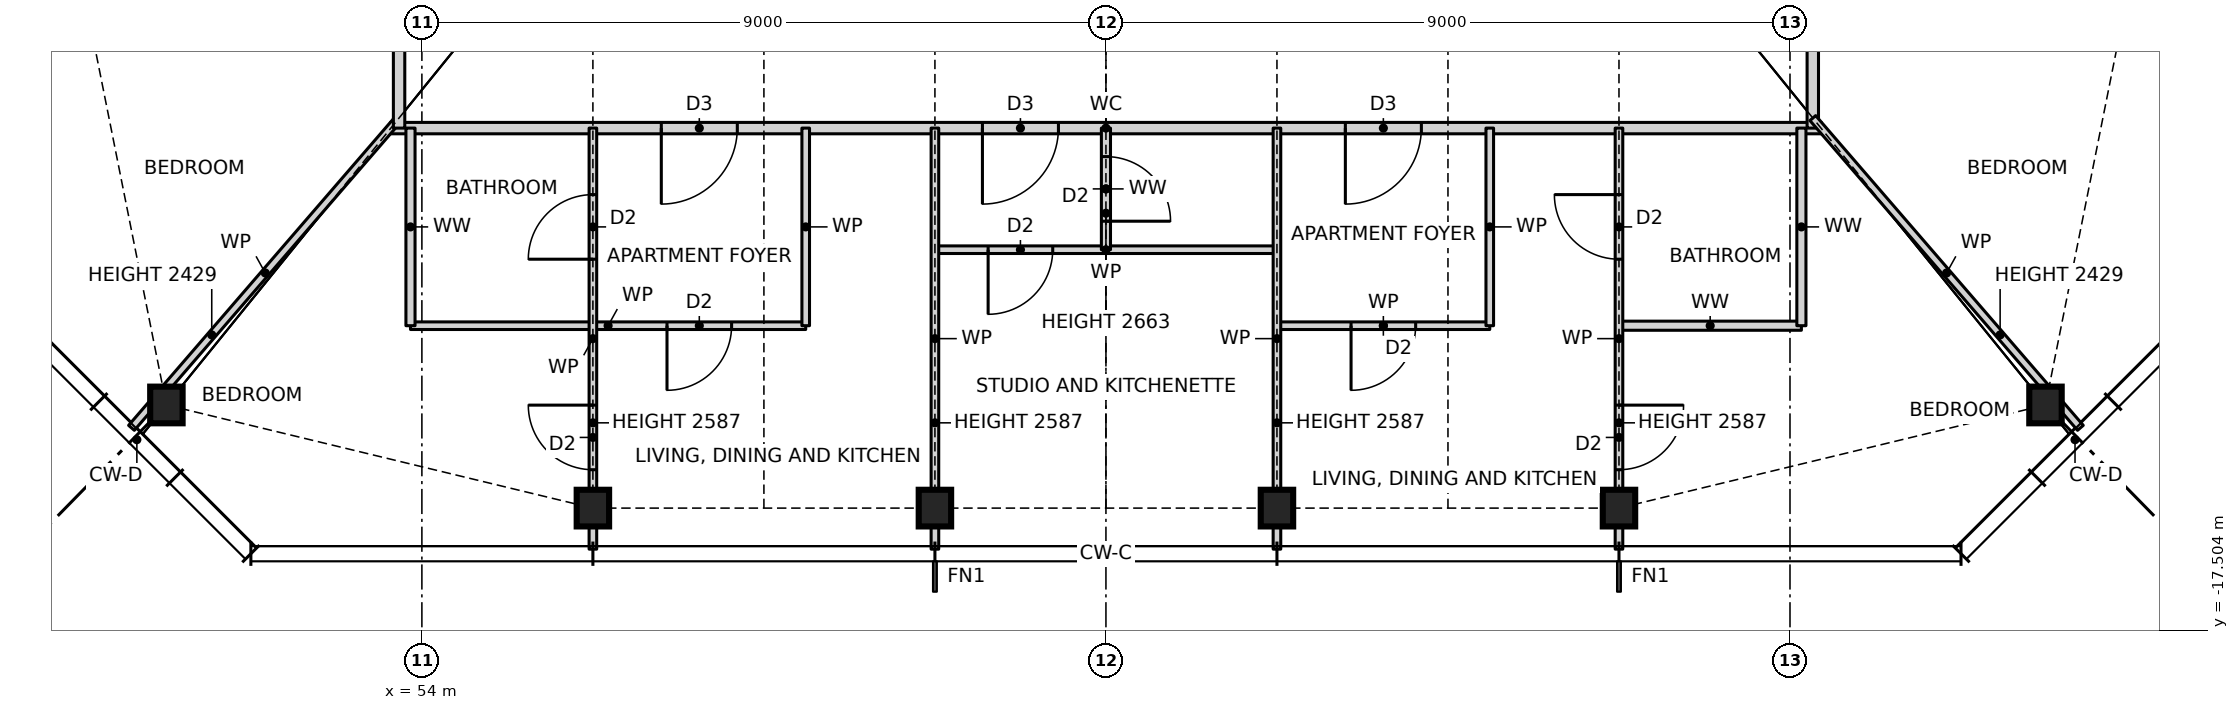
"""IFC4 building model, lengths in metres.
Left out: names, types, materials, properties, quantities, classifications, styles, units other than length and angle.
Written with IfcOpenShell. Run it as: python <this file> out.ifc"""

import sys

from ifc_helpers import new_model, si_unit, direction, frame, frame_2d, origin, origin_2d, place, context, subcontext, project, spatial, rectangle, i_section, extrude, element, fill, save


model = new_model("IFC4")
c1 = context("Model", 3, precision=1e-05, world=origin(), true_north=direction((0.0, 1.0)))
c2 = subcontext(c1, "Body", "Model", "MODEL_VIEW")
j1 = project(units=[si_unit("LENGTHUNIT", "METRE"), si_unit("PLANEANGLEUNIT", "RADIAN")], contexts=[c1])
p1 = place(None, origin())
s1 = spatial("IfcSite", under=j1, at=p1, CompositionType="ELEMENT")
p2 = place(p1, origin())
s2 = spatial("IfcBuilding", under=s1, at=p2, CompositionType="ELEMENT")
p3 = place(p2, frame((0.0, 0.0, 87.5)))
s3 = spatial("IfcBuildingStorey", under=s2, at=p3, CompositionType="ELEMENT", Elevation=87.5)
for number, where, z_axis, x_axis in (
    (1, (50.639, -14.543, 0.0), (0.0, 0.0, 1.0), (1.0, 0.0, 0.0)),
    (2, (56.25, -15.9, 0.0), (0.0, 0.0, 1.0), (1.0, 0.0, 0.0)),
    (3, (60.75, -15.9, 0.0), (0.0, 0.0, 1.0), (1.0, 0.0, 0.0)),
    (4, (65.25, -15.9, 0.0), (0.0, 0.0, 1.0), (1.0, 0.0, 0.0)),
    (5, (69.75, -15.9, 0.0), (0.0, 0.0, 1.0), (1.0, 0.0, 0.0)),
    (6, (75.361, -14.543, 0.0), (0.0, 0.0, 1.0), (1.0, 0.0, 0.0)),
):
    element("IfcColumn", number, at=place(p3, frame(where, z_axis=z_axis, x_axis=x_axis)), inside=s3, PredefinedType="COLUMN", context=c2, shape_type="SweptSolid", body=[
        extrude(i_section(OverallWidth=0.427, OverallDepth=0.483, WebThickness=0.051, FlangeThickness=0.082, at=origin_2d()), origin(), (0.0, 0.0, 1.0), 3.5),
    ])
p4 = place(p3, frame((53.85, -13.5, 0.0), z_axis=(0.0, 0.0, 1.0), x_axis=(1.0, 0.0, 0.0)))
e7 = element("IfcWall", 7, at=p4, inside=s3, PredefinedType="PARTITIONING", context=c2, shape_type="SweptSolid", body=[
    extrude(rectangle(XDim=5.2, YDim=0.1, at=frame_2d((2.6, 0.0))), origin(), (0.0, 0.0, 1.0), 3.27),
])
p5 = place(p4, frame((3.375, 0.0, 0.0)))
e8 = element("IfcOpeningElement", 8, at=p5, cuts=e7, PredefinedType="OPENING", context=c2, shape_type="SweptSolid", body=[
    extrude(rectangle(XDim=0.85, YDim=2.1, at=frame_2d((0.425, 1.05))), frame((0.0, 0.06, 0.0), z_axis=(0.0, -1.0, 0.0), x_axis=(1.0, 0.0, 0.0)), (0.0, 0.0, 1.0), 0.12),
])
p6 = place(p3, frame((65.25, -13.5, 0.0), z_axis=(0.0, 0.0, 1.0), x_axis=(1.0, 0.0, 0.0)))
e9 = element("IfcWall", 9, at=p6, inside=s3, PredefinedType="PARTITIONING", context=c2, shape_type="SweptSolid", body=[
    extrude(rectangle(XDim=2.8, YDim=0.1, at=frame_2d((1.4, 0.0))), origin(), (0.0, 0.0, 1.0), 3.27),
])
p7 = place(p6, frame((0.975, 0.0, 0.0)))
e10 = element("IfcOpeningElement", 10, at=p7, cuts=e9, PredefinedType="OPENING", context=c2, shape_type="SweptSolid", body=[
    extrude(rectangle(XDim=0.85, YDim=2.1, at=frame_2d((0.425, 1.05))), frame((0.0, 0.06, 0.0), z_axis=(0.0, -1.0, 0.0), x_axis=(1.0, 0.0, 0.0)), (0.0, 0.0, 1.0), 0.12),
])
p8 = place(p3, frame((69.75, -13.5, 0.0), z_axis=(0.0, 0.0, 1.0), x_axis=(1.0, 0.0, 0.0)))
e11 = element("IfcWall", 11, at=p8, inside=s3, PredefinedType="PARTITIONING", context=c2, shape_type="SweptSolid", body=[
    extrude(rectangle(XDim=2.4, YDim=0.12, at=frame_2d((1.2, 0.0))), origin(), (0.0, 0.0, 1.0), 3.27),
])
p9 = place(p3, frame((60.75, -12.5, 0.0), z_axis=(0.0, 0.0, 1.0), x_axis=(1.0, 0.0, 0.0)))
e12 = element("IfcWall", 12, at=p9, inside=s3, PredefinedType="PARTITIONING", context=c2, shape_type="SweptSolid", body=[
    extrude(rectangle(XDim=4.5, YDim=0.1, at=frame_2d((2.25, 0.0))), origin(), (0.0, 0.0, 1.0), 3.27),
])
p10 = place(p9, frame((0.7, 0.0, 0.0)))
e13 = element("IfcOpeningElement", 13, at=p10, cuts=e12, PredefinedType="OPENING", context=c2, shape_type="SweptSolid", body=[
    extrude(rectangle(XDim=0.85, YDim=2.1, at=frame_2d((0.425, 1.05))), frame((0.0, 0.06, 0.0), z_axis=(0.0, -1.0, 0.0), x_axis=(1.0, 0.0, 0.0)), (0.0, 0.0, 1.0), 0.12),
])
p11 = place(p3, frame((53.586, -10.9, 0.0), z_axis=(0.0, 0.0, 1.0), x_axis=(1.0, 0.0, 0.0)))
e14 = element("IfcWall", 14, at=p11, inside=s3, PredefinedType="PARTITIONING", context=c2, shape_type="SweptSolid", body=[
    extrude(rectangle(XDim=18.828, YDim=0.15, at=frame_2d((9.414, 0.0))), origin(), (0.0, 0.0, 1.0), 3.27),
])
p12 = place(p11, frame((3.564, 0.0, 0.0)))
e15 = element("IfcOpeningElement", 15, at=p12, cuts=e14, PredefinedType="OPENING", context=c2, shape_type="SweptSolid", body=[
    extrude(rectangle(XDim=1.0, YDim=2.1, at=frame_2d((0.5, 1.05))), frame((0.0, 0.085, 0.0), z_axis=(0.0, -1.0, 0.0), x_axis=(1.0, 0.0, 0.0)), (0.0, 0.0, 1.0), 0.17),
])
p13 = place(p11, frame((7.789, 0.0, 0.0)))
e16 = element("IfcOpeningElement", 16, at=p13, cuts=e14, PredefinedType="OPENING", context=c2, shape_type="SweptSolid", body=[
    extrude(rectangle(XDim=1.0, YDim=2.1, at=frame_2d((0.5, 1.05))), frame((0.0, 0.085, 0.0), z_axis=(0.0, -1.0, 0.0), x_axis=(1.0, 0.0, 0.0)), (0.0, 0.0, 1.0), 0.17),
])
p14 = place(p11, frame((12.564, 0.0, 0.0)))
e17 = element("IfcOpeningElement", 17, at=p14, cuts=e14, PredefinedType="OPENING", context=c2, shape_type="SweptSolid", body=[
    extrude(rectangle(XDim=1.0, YDim=2.1, at=frame_2d((0.5, 1.05))), frame((0.0, 0.085, 0.0), z_axis=(0.0, -1.0, 0.0), x_axis=(1.0, 0.0, 0.0)), (0.0, 0.0, 1.0), 0.17),
])
p15 = place(p3, frame((50.179, -14.844, 0.0), z_axis=(0.0, 0.0, 1.0), x_axis=(0.653713095188, 0.756742485381, 0.0)))
e18 = element("IfcWall", 18, at=p15, inside=s3, PredefinedType="PARTITIONING", context=c2, shape_type="SweptSolid", body=[
    extrude(rectangle(XDim=5.386, YDim=0.1, at=frame_2d((2.693, 0.0))), origin(), (0.0, 0.0, 1.0), 2.429),
])
p16 = place(p3, frame((72.3, -10.9, 0.0), z_axis=(0.0, 0.0, 1.0), x_axis=(0.0, 1.0, 0.0)))
e19 = element("IfcWall", 19, at=p16, inside=s3, PredefinedType="PARTITIONING", context=c2, shape_type="SweptSolid", body=[
    extrude(rectangle(XDim=21.668, YDim=0.15, at=frame_2d((10.834, 0.0))), origin(), (0.0, 0.0, 1.0), 3.27),
])
p17 = place(p16, frame((10.4, 0.0, 0.0)))
e20 = element("IfcOpeningElement", 20, at=p17, cuts=e19, PredefinedType="OPENING", context=c2, shape_type="SweptSolid", body=[
    extrude(rectangle(XDim=1.0, YDim=2.1, at=frame_2d((0.5, 1.05))), frame((0.0, 0.085, 0.0), z_axis=(0.0, -1.0, 0.0), x_axis=(1.0, 0.0, 0.0)), (0.0, 0.0, 1.0), 0.17),
])
p18 = place(p3, frame((72.15, -13.5, 0.0), z_axis=(0.0, 0.0, 1.0), x_axis=(0.0, 1.0, 0.0)))
e21 = element("IfcWall", 21, at=p18, inside=s3, PredefinedType="PARTITIONING", context=c2, shape_type="SweptSolid", body=[
    extrude(rectangle(XDim=2.6, YDim=0.12, at=frame_2d((1.3, 0.0))), origin(), (0.0, 0.0, 1.0), 3.27),
])
p19 = place(p3, frame((69.75, -16.44, 0.0), z_axis=(0.0, 0.0, 1.0), x_axis=(0.0, 1.0, 0.0)))
e22 = element("IfcWall", 22, at=p19, inside=s3, PredefinedType="PARTITIONING", context=c2, shape_type="SweptSolid", body=[
    extrude(rectangle(XDim=5.54, YDim=0.1, at=frame_2d((2.77, 0.0))), origin(), (0.0, 0.0, 1.0), 2.587),
])
p20 = place(p19, frame((3.815, 0.0, 0.0)))
e23 = element("IfcOpeningElement", 23, at=p20, cuts=e22, PredefinedType="OPENING", context=c2, shape_type="SweptSolid", body=[
    extrude(rectangle(XDim=0.85, YDim=2.1, at=frame_2d((0.425, 1.05))), frame((0.0, 0.06, 0.0), z_axis=(0.0, -1.0, 0.0), x_axis=(1.0, 0.0, 0.0)), (0.0, 0.0, 1.0), 0.12),
])
p21 = place(p19, frame((1.045, 0.0, 0.0)))
e24 = element("IfcOpeningElement", 24, at=p21, cuts=e22, PredefinedType="OPENING", context=c2, shape_type="SweptSolid", body=[
    extrude(rectangle(XDim=0.85, YDim=2.1, at=frame_2d((0.425, 1.05))), frame((0.0, 0.06, 0.0), z_axis=(0.0, -1.0, 0.0), x_axis=(1.0, 0.0, 0.0)), (0.0, 0.0, 1.0), 0.12),
])
p22 = place(p3, frame((68.05, -13.5, 0.0), z_axis=(0.0, 0.0, 1.0), x_axis=(0.0, 1.0, 0.0)))
e25 = element("IfcWall", 25, at=p22, inside=s3, PredefinedType="PARTITIONING", context=c2, shape_type="SweptSolid", body=[
    extrude(rectangle(XDim=2.6, YDim=0.1, at=frame_2d((1.3, 0.0))), origin(), (0.0, 0.0, 1.0), 3.27),
])
p23 = place(p3, frame((65.25, -16.44, 0.0), z_axis=(0.0, 0.0, 1.0), x_axis=(0.0, 1.0, 0.0)))
e26 = element("IfcWall", 26, at=p23, inside=s3, PredefinedType="PARTITIONING", context=c2, shape_type="SweptSolid", body=[
    extrude(rectangle(XDim=5.54, YDim=0.1, at=frame_2d((2.77, 0.0))), origin(), (0.0, 0.0, 1.0), 2.587),
])
p24 = place(p3, frame((63.0, -12.5, 0.0), z_axis=(0.0, 0.0, 1.0), x_axis=(0.0, 1.0, 0.0)))
e27 = element("IfcWall", 27, at=p24, inside=s3, PredefinedType="PARTITIONING", context=c2, shape_type="SweptSolid", body=[
    extrude(rectangle(XDim=1.6, YDim=0.12, at=frame_2d((0.8, 0.0))), origin(), (0.0, 0.0, 1.0), 2.663),
])
p25 = place(p24, frame((0.375, 0.0, 0.0)))
e28 = element("IfcOpeningElement", 28, at=p25, cuts=e27, PredefinedType="OPENING", context=c2, shape_type="SweptSolid", body=[
    extrude(rectangle(XDim=0.85, YDim=2.1, at=frame_2d((0.425, 1.05))), frame((0.0, 0.07, 0.0), z_axis=(0.0, -1.0, 0.0), x_axis=(1.0, 0.0, 0.0)), (0.0, 0.0, 1.0), 0.14),
])
p26 = place(p3, frame((60.75, -16.44, 0.0), z_axis=(0.0, 0.0, 1.0), x_axis=(0.0, 1.0, 0.0)))
e29 = element("IfcWall", 29, at=p26, inside=s3, PredefinedType="PARTITIONING", context=c2, shape_type="SweptSolid", body=[
    extrude(rectangle(XDim=5.54, YDim=0.1, at=frame_2d((2.77, 0.0))), origin(), (0.0, 0.0, 1.0), 2.587),
])
p27 = place(p3, frame((59.05, -13.5, 0.0), z_axis=(0.0, 0.0, 1.0), x_axis=(0.0, 1.0, 0.0)))
e30 = element("IfcWall", 30, at=p27, inside=s3, PredefinedType="PARTITIONING", context=c2, shape_type="SweptSolid", body=[
    extrude(rectangle(XDim=2.6, YDim=0.1, at=frame_2d((1.3, 0.0))), origin(), (0.0, 0.0, 1.0), 3.27),
])
p28 = place(p3, frame((56.25, -16.44, 0.0), z_axis=(0.0, 0.0, 1.0), x_axis=(0.0, 1.0, 0.0)))
e31 = element("IfcWall", 31, at=p28, inside=s3, PredefinedType="PARTITIONING", context=c2, shape_type="SweptSolid", body=[
    extrude(rectangle(XDim=5.54, YDim=0.1, at=frame_2d((2.77, 0.0))), origin(), (0.0, 0.0, 1.0), 2.587),
])
p29 = place(p28, frame((3.815, 0.0, 0.0)))
e32 = element("IfcOpeningElement", 32, at=p29, cuts=e31, PredefinedType="OPENING", context=c2, shape_type="SweptSolid", body=[
    extrude(rectangle(XDim=0.85, YDim=2.1, at=frame_2d((0.425, 1.05))), frame((0.0, 0.06, 0.0), z_axis=(0.0, -1.0, 0.0), x_axis=(1.0, 0.0, 0.0)), (0.0, 0.0, 1.0), 0.12),
])
p30 = place(p28, frame((1.045, 0.0, 0.0)))
e33 = element("IfcOpeningElement", 33, at=p30, cuts=e31, PredefinedType="OPENING", context=c2, shape_type="SweptSolid", body=[
    extrude(rectangle(XDim=0.85, YDim=2.1, at=frame_2d((0.425, 1.05))), frame((0.0, 0.06, 0.0), z_axis=(0.0, -1.0, 0.0), x_axis=(1.0, 0.0, 0.0)), (0.0, 0.0, 1.0), 0.12),
])
p31 = place(p3, frame((53.85, -13.5, 0.0), z_axis=(0.0, 0.0, 1.0), x_axis=(0.0, 1.0, 0.0)))
e34 = element("IfcWall", 34, at=p31, inside=s3, PredefinedType="PARTITIONING", context=c2, shape_type="SweptSolid", body=[
    extrude(rectangle(XDim=2.6, YDim=0.12, at=frame_2d((1.3, 0.0))), origin(), (0.0, 0.0, 1.0), 3.27),
])
p32 = place(p3, frame((53.7, -10.9, 0.0), z_axis=(0.0, 0.0, 1.0), x_axis=(0.0, 1.0, 0.0)))
e35 = element("IfcWall", 35, at=p32, inside=s3, PredefinedType="PARTITIONING", context=c2, shape_type="SweptSolid", body=[
    extrude(rectangle(XDim=21.668, YDim=0.15, at=frame_2d((10.834, 0.0))), origin(), (0.0, 0.0, 1.0), 3.27),
])
p33 = place(p32, frame((18.0, 0.0, 0.0)))
e36 = element("IfcOpeningElement", 36, at=p33, cuts=e35, PredefinedType="OPENING", context=c2, shape_type="SweptSolid", body=[
    extrude(rectangle(XDim=1.0, YDim=2.1, at=frame_2d((0.5, 1.05))), frame((0.0, 0.085, 0.0), z_axis=(0.0, -1.0, 0.0), x_axis=(1.0, 0.0, 0.0)), (0.0, 0.0, 1.0), 0.17),
])
p34 = place(p32, frame((5.4, 0.0, 0.0)))
e37 = element("IfcOpeningElement", 37, at=p34, cuts=e35, PredefinedType="OPENING", context=c2, shape_type="SweptSolid", body=[
    extrude(rectangle(XDim=1.0, YDim=2.1, at=frame_2d((0.5, 1.05))), frame((0.0, 0.085, 0.0), z_axis=(0.0, -1.0, 0.0), x_axis=(1.0, 0.0, 0.0)), (0.0, 0.0, 1.0), 0.17),
])
p35 = place(p3, frame((75.821, -14.844, 0.0), z_axis=(0.0, 0.0, 1.0), x_axis=(-0.653713095188, 0.756742485381, 0.0)))
e38 = element("IfcWall", 38, at=p35, inside=s3, PredefinedType="PARTITIONING", context=c2, shape_type="SweptSolid", body=[
    extrude(rectangle(XDim=5.386, YDim=0.1, at=frame_2d((2.693, 0.0))), origin(), (0.0, 0.0, 1.0), 2.429),
])
p36 = place(p12, frame((1.0, 0.0, 0.0), z_axis=(0.0, 0.0, 1.0), x_axis=(-1.0, 0.0, 0.0)))
e39 = element("IfcDoor", 39, at=p36, inside=s3, OperationType="SINGLE_SWING_RIGHT", PredefinedType="DOOR", context=c2, shape_type="SweptSolid", body=[
    extrude(rectangle(XDim=1.0, YDim=2.1, at=frame_2d((0.5, 1.05))), frame((0.0, 0.025, 0.0), z_axis=(0.0, -1.0, 0.0), x_axis=(1.0, 0.0, 0.0)), (0.0, 0.0, 1.0), 0.05),
])
fill(e15, e39)
p37 = place(p5, frame((0.85, 0.0, 0.0), z_axis=(0.0, 0.0, 1.0), x_axis=(-1.0, 0.0, 0.0)))
e40 = element("IfcDoor", 40, at=p37, inside=s3, OperationType="SINGLE_SWING_RIGHT", PredefinedType="DOOR", context=c2, shape_type="SweptSolid", body=[
    extrude(rectangle(XDim=0.85, YDim=2.1, at=frame_2d((0.425, 1.05))), frame((0.0, 0.025, 0.0), z_axis=(0.0, -1.0, 0.0), x_axis=(1.0, 0.0, 0.0)), (0.0, 0.0, 1.0), 0.05),
])
fill(e8, e40)
p38 = place(p29, origin())
e41 = element("IfcDoor", 41, at=p38, inside=s3, OperationType="SINGLE_SWING_LEFT", PredefinedType="DOOR", context=c2, shape_type="SweptSolid", body=[
    extrude(rectangle(XDim=0.85, YDim=2.1, at=frame_2d((0.425, 1.05))), frame((0.0, 0.025, 0.0), z_axis=(0.0, -1.0, 0.0), x_axis=(1.0, 0.0, 0.0)), (0.0, 0.0, 1.0), 0.05),
])
fill(e32, e41)
p39 = place(p30, origin())
e42 = element("IfcDoor", 42, at=p39, inside=s3, OperationType="SINGLE_SWING_RIGHT", PredefinedType="DOOR", context=c2, shape_type="SweptSolid", body=[
    extrude(rectangle(XDim=0.85, YDim=2.1, at=frame_2d((0.425, 1.05))), frame((0.0, 0.025, 0.0), z_axis=(0.0, -1.0, 0.0), x_axis=(1.0, 0.0, 0.0)), (0.0, 0.0, 1.0), 0.05),
])
fill(e33, e42)
p40 = place(p10, frame((0.85, 0.0, 0.0), z_axis=(0.0, 0.0, 1.0), x_axis=(-1.0, 0.0, 0.0)))
e43 = element("IfcDoor", 43, at=p40, inside=s3, OperationType="SINGLE_SWING_RIGHT", PredefinedType="DOOR", context=c2, shape_type="SweptSolid", body=[
    extrude(rectangle(XDim=0.85, YDim=2.1, at=frame_2d((0.425, 1.05))), frame((0.0, 0.025, 0.0), z_axis=(0.0, -1.0, 0.0), x_axis=(1.0, 0.0, 0.0)), (0.0, 0.0, 1.0), 0.05),
])
fill(e13, e43)
p41 = place(p13, frame((1.0, 0.0, 0.0), z_axis=(0.0, 0.0, 1.0), x_axis=(-1.0, 0.0, 0.0)))
e44 = element("IfcDoor", 44, at=p41, inside=s3, OperationType="SINGLE_SWING_RIGHT", PredefinedType="DOOR", context=c2, shape_type="SweptSolid", body=[
    extrude(rectangle(XDim=1.0, YDim=2.1, at=frame_2d((0.5, 1.05))), frame((0.0, 0.025, 0.0), z_axis=(0.0, -1.0, 0.0), x_axis=(1.0, 0.0, 0.0)), (0.0, 0.0, 1.0), 0.05),
])
fill(e16, e44)
p42 = place(p25, frame((0.85, 0.0, 0.0), z_axis=(0.0, 0.0, 1.0), x_axis=(-1.0, 0.0, 0.0)))
e45 = element("IfcDoor", 45, at=p42, inside=s3, OperationType="SINGLE_SWING_RIGHT", PredefinedType="DOOR", context=c2, shape_type="SweptSolid", body=[
    extrude(rectangle(XDim=0.85, YDim=2.1, at=frame_2d((0.425, 1.05))), frame((0.0, 0.025, 0.0), z_axis=(0.0, -1.0, 0.0), x_axis=(1.0, 0.0, 0.0)), (0.0, 0.0, 1.0), 0.05),
])
fill(e28, e45)
p43 = place(p14, frame((1.0, 0.0, 0.0), z_axis=(0.0, 0.0, 1.0), x_axis=(-1.0, 0.0, 0.0)))
e46 = element("IfcDoor", 46, at=p43, inside=s3, OperationType="SINGLE_SWING_RIGHT", PredefinedType="DOOR", context=c2, shape_type="SweptSolid", body=[
    extrude(rectangle(XDim=1.0, YDim=2.1, at=frame_2d((0.5, 1.05))), frame((0.0, 0.025, 0.0), z_axis=(0.0, -1.0, 0.0), x_axis=(1.0, 0.0, 0.0)), (0.0, 0.0, 1.0), 0.05),
])
fill(e17, e46)
p44 = place(p7, frame((0.85, 0.0, 0.0), z_axis=(0.0, 0.0, 1.0), x_axis=(-1.0, 0.0, 0.0)))
e47 = element("IfcDoor", 47, at=p44, inside=s3, OperationType="SINGLE_SWING_RIGHT", PredefinedType="DOOR", context=c2, shape_type="SweptSolid", body=[
    extrude(rectangle(XDim=0.85, YDim=2.1, at=frame_2d((0.425, 1.05))), frame((0.0, 0.025, 0.0), z_axis=(0.0, -1.0, 0.0), x_axis=(1.0, 0.0, 0.0)), (0.0, 0.0, 1.0), 0.05),
])
fill(e10, e47)
p45 = place(p20, origin())
e48 = element("IfcDoor", 48, at=p45, inside=s3, OperationType="SINGLE_SWING_RIGHT", PredefinedType="DOOR", context=c2, shape_type="SweptSolid", body=[
    extrude(rectangle(XDim=0.85, YDim=2.1, at=frame_2d((0.425, 1.05))), frame((0.0, 0.025, 0.0), z_axis=(0.0, -1.0, 0.0), x_axis=(1.0, 0.0, 0.0)), (0.0, 0.0, 1.0), 0.05),
])
fill(e23, e48)
p46 = place(p21, frame((0.85, 0.0, 0.0), z_axis=(0.0, 0.0, 1.0), x_axis=(-1.0, 0.0, 0.0)))
e49 = element("IfcDoor", 49, at=p46, inside=s3, OperationType="SINGLE_SWING_LEFT", PredefinedType="DOOR", context=c2, shape_type="SweptSolid", body=[
    extrude(rectangle(XDim=0.85, YDim=2.1, at=frame_2d((0.425, 1.05))), frame((0.0, 0.025, 0.0), z_axis=(0.0, -1.0, 0.0), x_axis=(1.0, 0.0, 0.0)), (0.0, 0.0, 1.0), 0.05),
])
fill(e24, e49)
save(model, sys.argv[1])
